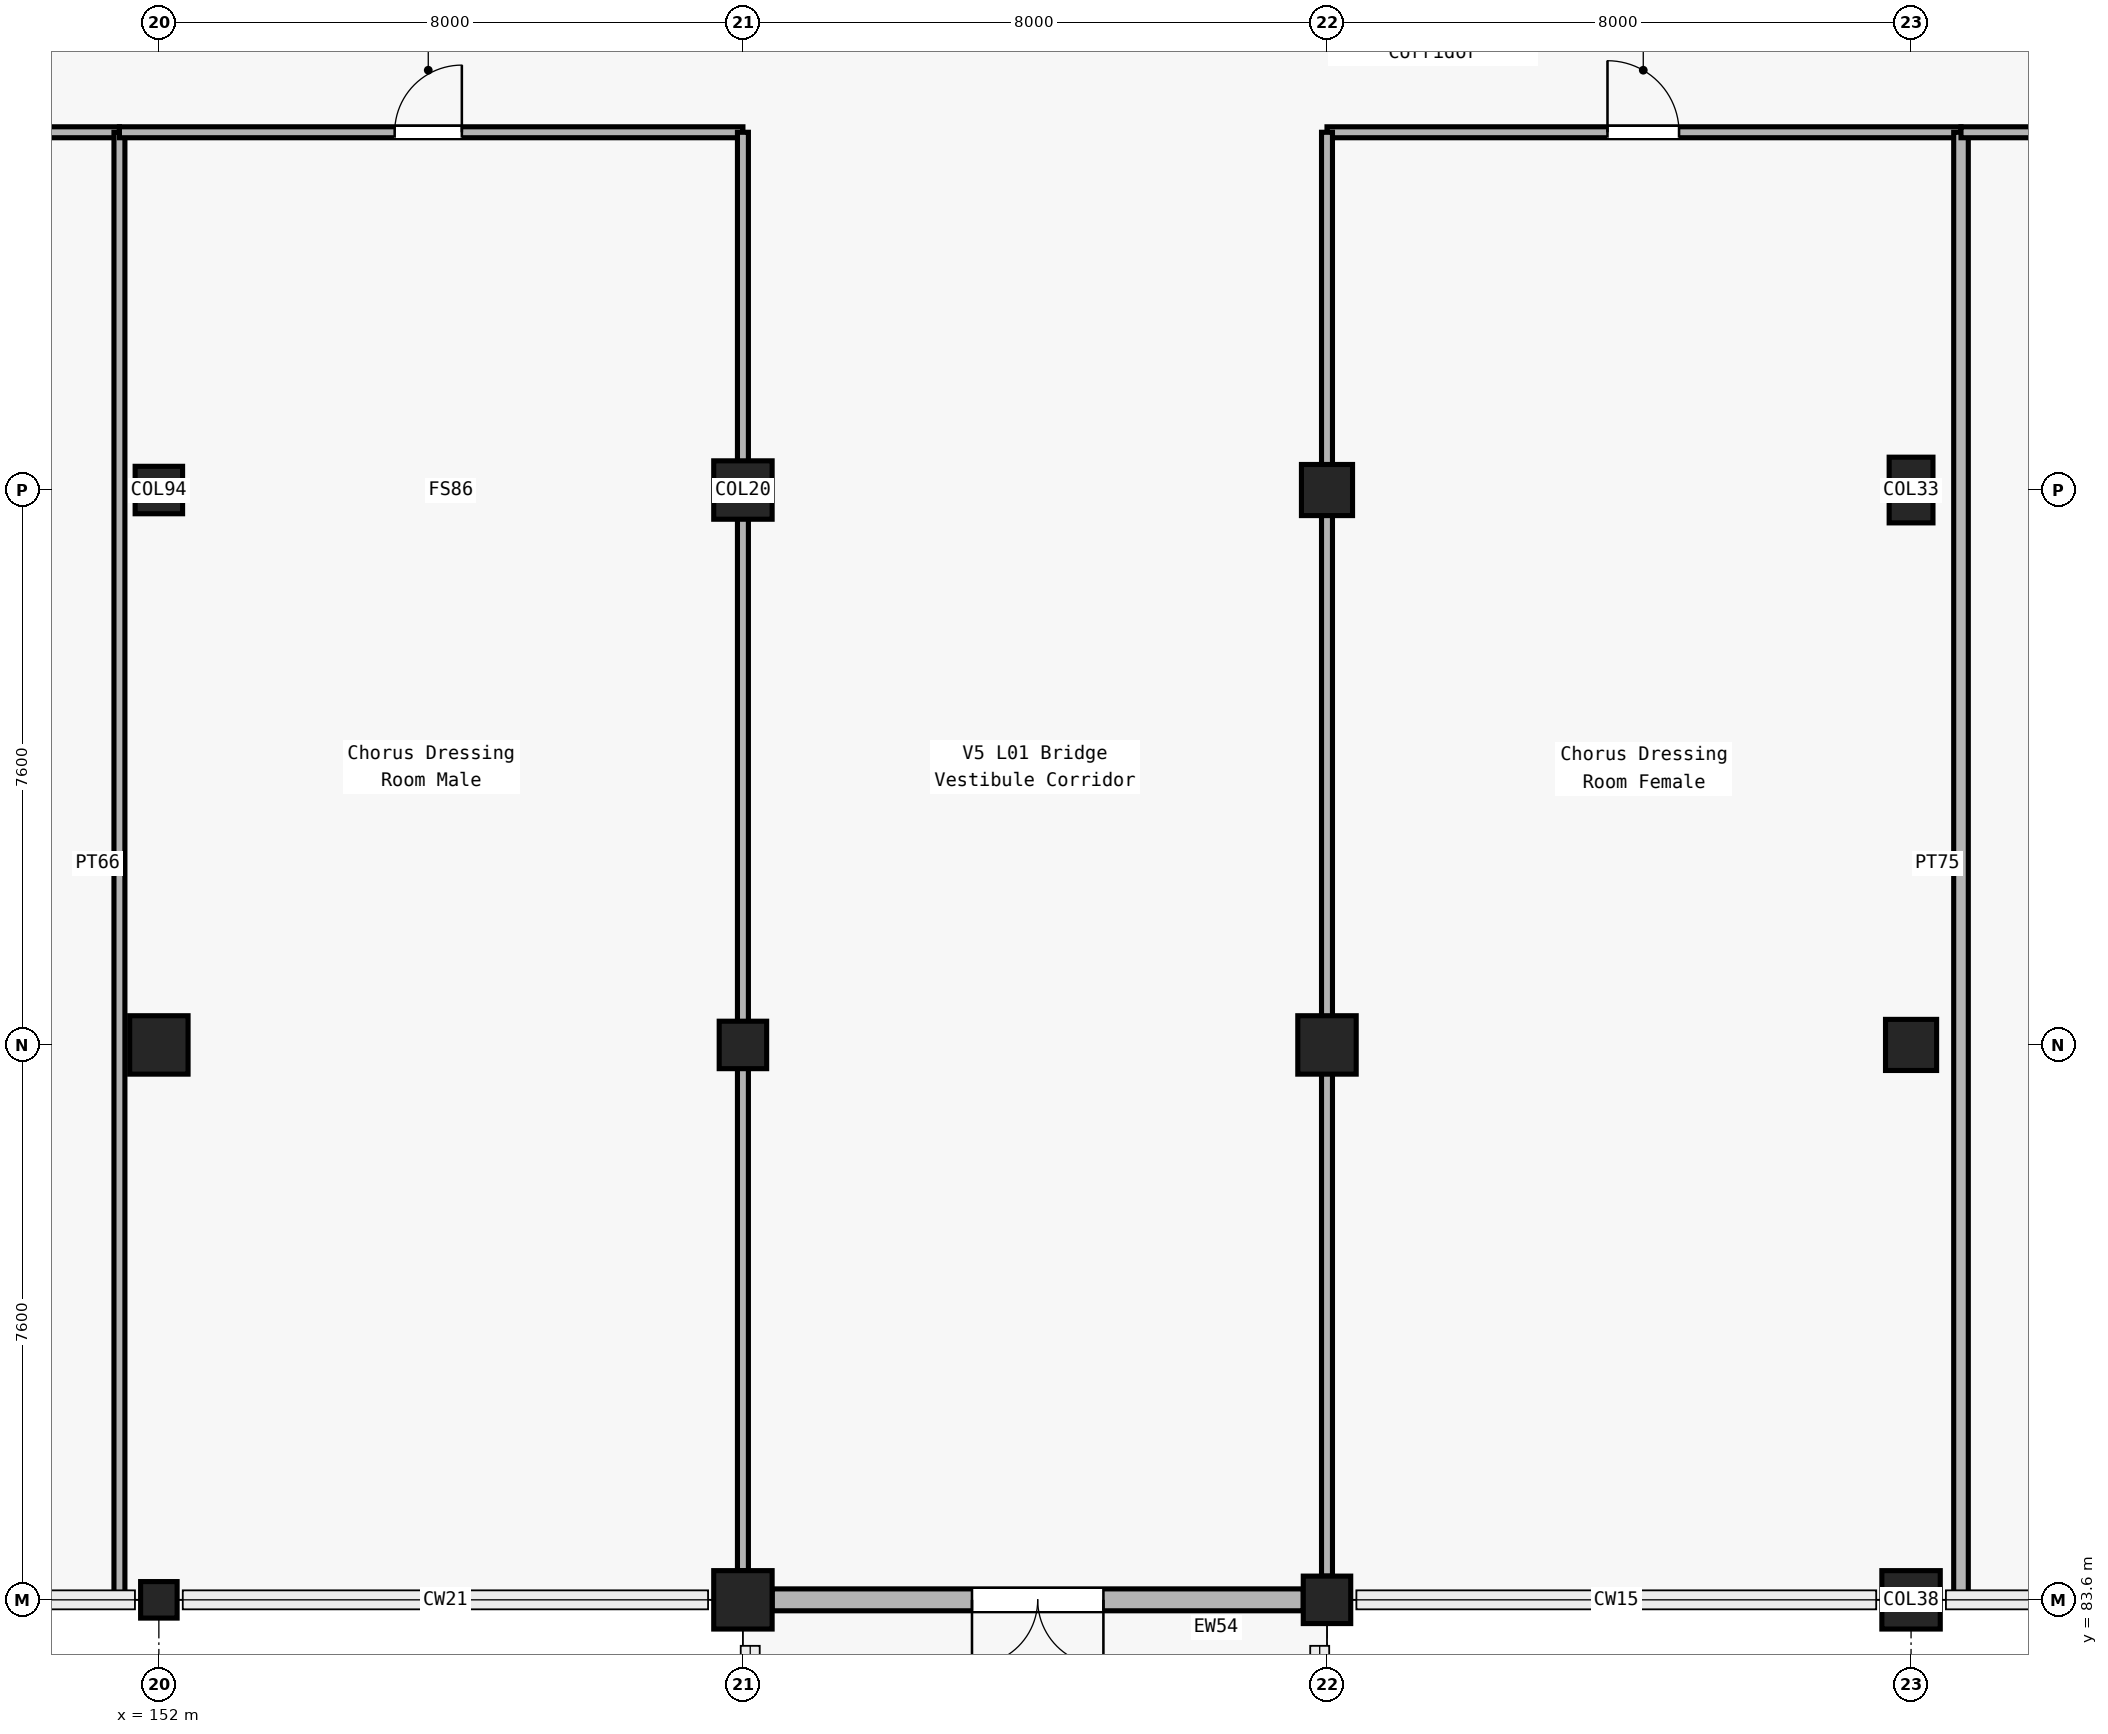
"""IFC4 building model, lengths in metres.
Left out: names, types, materials, properties, quantities, classifications, styles, units other than length and angle.
Written with IfcOpenShell. Run it as: python <this file> out.ifc"""

import sys

from ifc_helpers import new_model, si_unit, direction, frame, frame_2d, origin, origin_2d, place, context, subcontext, project, spatial, rectangle, circle, extrude, element, fill, save


model = new_model("IFC4")
c1 = context("Model", 3, precision=1e-05, world=origin(), true_north=direction((0.0, 1.0)))
c2 = subcontext(c1, "Body", "Model", "MODEL_VIEW")
j1 = project(units=[si_unit("LENGTHUNIT", "METRE"), si_unit("PLANEANGLEUNIT", "RADIAN")], contexts=[c1])
p1 = place(None, origin())
s1 = spatial("IfcSite", under=j1, at=p1, CompositionType="ELEMENT")
p2 = place(p1, origin())
s2 = spatial("IfcBuilding", under=s1, at=p2, CompositionType="ELEMENT")
p3 = place(p2, frame((0.0, 0.0, 5.4)))
s3 = spatial("IfcBuildingStorey", under=s2, at=p3, CompositionType="ELEMENT", Elevation=5.4)
p4 = place(p3, frame((152.0, 83.6, 0.0), z_axis=(0.0, 0.0, 1.0), x_axis=(1.0, 0.0, 0.0)))
e1 = element("IfcColumn", 1, at=p4, inside=s3, PredefinedType="COLUMN", context=c2, shape_type="SweptSolid", body=[
    extrude(rectangle(XDim=0.5, YDim=0.5, at=origin_2d()), origin(), (0.0, 0.0, 1.0), 4.8),
])
p5 = place(p3, frame((152.0, 91.2, 0.0), z_axis=(0.0, 0.0, 1.0), x_axis=(1.0, 0.0, 0.0)))
e2 = element("IfcColumn", 2, at=p5, inside=s3, PredefinedType="COLUMN", context=c2, shape_type="SweptSolid", body=[
    extrude(circle(Radius=0.4, at=origin_2d()), origin(), (0.0, 0.0, 1.0), 4.8),
])
p6 = place(p3, frame((152.0, 98.8, 0.0), z_axis=(0.0, 0.0, 1.0), x_axis=(1.0, 0.0, 0.0)))
e3 = element("IfcColumn", 3, at=p6, inside=s3, PredefinedType="COLUMN", context=c2, shape_type="SweptSolid", body=[
    extrude(circle(Radius=0.325, at=origin_2d()), origin(), (0.0, 0.0, 1.0), 4.8),
])
p7 = place(p3, frame((160.0, 83.6, 0.0), z_axis=(0.0, 0.0, 1.0), x_axis=(1.0, 0.0, 0.0)))
e4 = element("IfcColumn", 4, at=p7, inside=s3, PredefinedType="COLUMN", context=c2, shape_type="SweptSolid", body=[
    extrude(circle(Radius=0.4, at=origin_2d()), origin(), (0.0, 0.0, 1.0), 4.8),
])
p8 = place(p3, frame((160.0, 91.2, 0.0), z_axis=(0.0, 0.0, 1.0), x_axis=(1.0, 0.0, 0.0)))
e5 = element("IfcColumn", 5, at=p8, inside=s3, PredefinedType="COLUMN", context=c2, shape_type="SweptSolid", body=[
    extrude(circle(Radius=0.325, at=origin_2d()), origin(), (0.0, 0.0, 1.0), 4.8),
])
p9 = place(p3, frame((160.0, 98.8, 0.0), z_axis=(0.0, 0.0, 1.0), x_axis=(1.0, 0.0, 0.0)))
e6 = element("IfcColumn", 6, at=p9, inside=s3, PredefinedType="COLUMN", context=c2, shape_type="SweptSolid", body=[
    extrude(rectangle(XDim=0.8, YDim=0.8, at=origin_2d()), origin(), (0.0, 0.0, 1.0), 4.8),
])
p10 = place(p3, frame((168.0, 83.6, 0.0), z_axis=(0.0, 0.0, 1.0), x_axis=(1.0, 0.0, 0.0)))
e7 = element("IfcColumn", 7, at=p10, inside=s3, PredefinedType="COLUMN", context=c2, shape_type="SweptSolid", body=[
    extrude(circle(Radius=0.325, at=origin_2d()), origin(), (0.0, 0.0, 1.0), 4.8),
])
p11 = place(p3, frame((168.0, 91.2, 0.0), z_axis=(0.0, 0.0, 1.0), x_axis=(1.0, 0.0, 0.0)))
e8 = element("IfcColumn", 8, at=p11, inside=s3, PredefinedType="COLUMN", context=c2, shape_type="SweptSolid", body=[
    extrude(rectangle(XDim=0.8, YDim=0.8, at=origin_2d()), origin(), (0.0, 0.0, 1.0), 4.8),
])
p12 = place(p3, frame((168.0, 98.8, 0.0), z_axis=(0.0, 0.0, 1.0), x_axis=(1.0, 0.0, 0.0)))
e9 = element("IfcColumn", 9, at=p12, inside=s3, PredefinedType="COLUMN", context=c2, shape_type="SweptSolid", body=[
    extrude(rectangle(XDim=0.7, YDim=0.7, at=origin_2d()), origin(), (0.0, 0.0, 1.0), 4.8),
])
p13 = place(p3, frame((176.0, 83.6, 0.0), z_axis=(0.0, 0.0, 1.0), x_axis=(1.0, 0.0, 0.0)))
e10 = element("IfcColumn", 10, at=p13, inside=s3, PredefinedType="COLUMN", context=c2, shape_type="SweptSolid", body=[
    extrude(rectangle(XDim=0.8, YDim=0.8, at=origin_2d()), origin(), (0.0, 0.0, 1.0), 4.8),
])
p14 = place(p3, frame((176.0, 91.2, 0.0), z_axis=(0.0, 0.0, 1.0), x_axis=(1.0, 0.0, 0.0)))
e11 = element("IfcColumn", 11, at=p14, inside=s3, PredefinedType="COLUMN", context=c2, shape_type="SweptSolid", body=[
    extrude(rectangle(XDim=0.7, YDim=0.7, at=origin_2d()), origin(), (0.0, 0.0, 1.0), 4.8),
])
p15 = place(p3, frame((176.0, 98.8, 0.0), z_axis=(0.0, 0.0, 1.0), x_axis=(1.0, 0.0, 0.0)))
e12 = element("IfcColumn", 12, at=p15, inside=s3, PredefinedType="COLUMN", context=c2, shape_type="SweptSolid", body=[
    extrude(rectangle(XDim=0.6, YDim=0.9, at=origin_2d()), origin(), (0.0, 0.0, 1.0), 4.8),
])
p16 = place(p3, frame((167.675, 83.6, 0.0), z_axis=(0.0, 0.0, 1.0), x_axis=(-1.0, 0.0, 0.0)))
e13 = element("IfcWall", 13, at=p16, inside=s3, PredefinedType="SOLIDWALL", context=c2, shape_type="SweptSolid", body=[
    extrude(rectangle(XDim=7.275, YDim=0.3, at=frame_2d((3.638, 0.0))), origin(), (0.0, 0.0, 1.0), 4.2),
])
p17 = place(p16, frame((2.738, 0.0, 0.0)))
e14 = element("IfcOpeningElement", 14, at=p17, cuts=e13, PredefinedType="OPENING", context=c2, shape_type="SweptSolid", body=[
    extrude(rectangle(XDim=1.8, YDim=2.25, at=frame_2d((0.9, 1.125))), frame((0.0, 0.16, 0.0), z_axis=(0.0, -1.0, 0.0), x_axis=(1.0, 0.0, 0.0)), (0.0, 0.0, 1.0), 0.32),
])
p18 = place(p3, frame((145.055, 103.7, 0.0), z_axis=(0.0, 0.0, 1.0), x_axis=(1.0, 0.0, 0.0)))
e15 = element("IfcWall", 15, at=p18, inside=s3, PredefinedType="PARTITIONING", context=c2, shape_type="SweptSolid", body=[
    extrude(rectangle(XDim=6.405, YDim=0.15, at=frame_2d((3.203, 0.0))), origin(), (0.0, 0.0, 1.0), 3.895),
])
p19 = place(p18, frame((2.206, 0.0, 0.0)))
e16 = element("IfcOpeningElement", 16, at=p19, cuts=e15, PredefinedType="OPENING", context=c2, shape_type="SweptSolid", body=[
    extrude(rectangle(XDim=1.42, YDim=2.2, at=frame_2d((0.71, 1.1))), frame((0.0, 0.085, 0.0), z_axis=(0.0, -1.0, 0.0), x_axis=(1.0, 0.0, 0.0)), (0.0, 0.0, 1.0), 0.17),
])
p20 = place(p3, frame((151.46, 83.68, 0.0), z_axis=(0.0, 0.0, 1.0), x_axis=(0.0, 1.0, 0.0)))
e17 = element("IfcWall", 17, at=p20, inside=s3, PredefinedType="PARTITIONING", context=c2, shape_type="SweptSolid", body=[
    extrude(rectangle(XDim=20.02, YDim=0.15, at=frame_2d((10.01, 0.0))), origin(), (0.0, 0.0, 1.0), 3.55),
])
p21 = place(p3, frame((151.46, 103.7, 0.0), z_axis=(0.0, 0.0, 1.0), x_axis=(1.0, 0.0, 0.0)))
e18 = element("IfcWall", 18, at=p21, inside=s3, PredefinedType="PARTITIONING", context=c2, shape_type="SweptSolid", body=[
    extrude(rectangle(XDim=8.54, YDim=0.15, at=frame_2d((4.27, 0.0))), origin(), (0.0, 0.0, 1.0), 3.685),
])
p22 = place(p21, frame((3.77, 0.0, 0.0)))
e19 = element("IfcOpeningElement", 19, at=p22, cuts=e18, PredefinedType="OPENING", context=c2, shape_type="SweptSolid", body=[
    extrude(rectangle(XDim=0.92, YDim=2.05, at=frame_2d((0.46, 1.025))), frame((0.0, 0.085, 0.0), z_axis=(0.0, -1.0, 0.0), x_axis=(1.0, 0.0, 0.0)), (0.0, 0.0, 1.0), 0.17),
])
p23 = place(p3, frame((160.0, 84.0, 0.0), z_axis=(0.0, 0.0, 1.0), x_axis=(0.0, 1.0, 0.0)))
e20 = element("IfcWall", 20, at=p23, inside=s3, PredefinedType="PARTITIONING", context=c2, shape_type="SweptSolid", body=[
    extrude(rectangle(XDim=19.7, YDim=0.15, at=frame_2d((9.85, 0.0))), origin(), (0.0, 0.0, 1.0), 2.69),
])
p24 = place(p3, frame((168.0, 103.7, 0.0), z_axis=(0.0, 0.0, 1.0), x_axis=(1.0, 0.0, 0.0)))
e21 = element("IfcWall", 21, at=p24, inside=s3, PredefinedType="PARTITIONING", context=c2, shape_type="SweptSolid", body=[
    extrude(rectangle(XDim=8.684, YDim=0.15, at=frame_2d((4.342, 0.0))), origin(), (0.0, 0.0, 1.0), 3.81),
])
p25 = place(p24, frame((3.842, 0.0, 0.0)))
e22 = element("IfcOpeningElement", 22, at=p25, cuts=e21, PredefinedType="OPENING", context=c2, shape_type="SweptSolid", body=[
    extrude(rectangle(XDim=0.98, YDim=2.05, at=frame_2d((0.49, 1.025))), frame((0.0, 0.085, 0.0), z_axis=(0.0, -1.0, 0.0), x_axis=(1.0, 0.0, 0.0)), (0.0, 0.0, 1.0), 0.17),
])
p26 = place(p3, frame((176.684, 83.68, 0.0), z_axis=(0.0, 0.0, 1.0), x_axis=(0.0, 1.0, 0.0)))
e23 = element("IfcWall", 23, at=p26, inside=s3, PredefinedType="PARTITIONING", context=c2, shape_type="SweptSolid", body=[
    extrude(rectangle(XDim=20.02, YDim=0.2, at=frame_2d((10.01, 0.0))), origin(), (0.0, 0.0, 1.0), 3.635),
])
p27 = place(p3, frame((176.684, 103.7, 0.0), z_axis=(0.0, 0.0, 1.0), x_axis=(1.0, 0.0, 0.0)))
e24 = element("IfcWall", 24, at=p27, inside=s3, PredefinedType="PARTITIONING", context=c2, shape_type="SweptSolid", body=[
    extrude(rectangle(XDim=7.236, YDim=0.15, at=frame_2d((3.618, 0.0))), origin(), (0.0, 0.0, 1.0), 3.76),
])
p28 = place(p27, frame((2.538, 0.0, 0.0)))
e25 = element("IfcOpeningElement", 25, at=p28, cuts=e24, PredefinedType="OPENING", context=c2, shape_type="SweptSolid", body=[
    extrude(rectangle(XDim=0.9, YDim=2.1, at=frame_2d((0.45, 1.05))), frame((0.0, 0.085, 0.0), z_axis=(0.0, -1.0, 0.0), x_axis=(1.0, 0.0, 0.0)), (0.0, 0.0, 1.0), 0.17),
])
p29 = place(p3, frame((168.0, 83.925, 0.0), z_axis=(0.0, 0.0, 1.0), x_axis=(0.0, 1.0, 0.0)))
e26 = element("IfcWall", 26, at=p29, inside=s3, PredefinedType="PARTITIONING", context=c2, shape_type="SweptSolid", body=[
    extrude(rectangle(XDim=19.775, YDim=0.15, at=frame_2d((9.887, 0.0))), origin(), (0.0, 0.0, 1.0), 2.69),
])
p30 = place(p17, origin())
e27 = element("IfcDoor", 27, at=p30, inside=s3, OperationType="DOUBLE_DOOR_SINGLE_SWING", PredefinedType="DOOR", context=c2, shape_type="SweptSolid", body=[
    extrude(rectangle(XDim=1.8, YDim=2.25, at=frame_2d((0.9, 1.125))), frame((0.0, 0.025, 0.0), z_axis=(0.0, -1.0, 0.0), x_axis=(1.0, 0.0, 0.0)), (0.0, 0.0, 1.0), 0.05),
])
fill(e14, e27)
p31 = place(p22, origin())
e28 = element("IfcDoor", 28, at=p31, inside=s3, OperationType="SINGLE_SWING_RIGHT", PredefinedType="DOOR", context=c2, shape_type="SweptSolid", body=[
    extrude(rectangle(XDim=0.92, YDim=2.05, at=frame_2d((0.46, 1.025))), frame((0.0, 0.025, 0.0), z_axis=(0.0, -1.0, 0.0), x_axis=(1.0, 0.0, 0.0)), (0.0, 0.0, 1.0), 0.05),
])
fill(e19, e28)
p32 = place(p25, origin())
e29 = element("IfcDoor", 29, at=p32, inside=s3, OperationType="SINGLE_SWING_LEFT", PredefinedType="DOOR", context=c2, shape_type="SweptSolid", body=[
    extrude(rectangle(XDim=0.98, YDim=2.05, at=frame_2d((0.49, 1.025))), frame((0.0, 0.025, 0.0), z_axis=(0.0, -1.0, 0.0), x_axis=(1.0, 0.0, 0.0)), (0.0, 0.0, 1.0), 0.05),
])
fill(e22, e29)
save(model, sys.argv[1])
